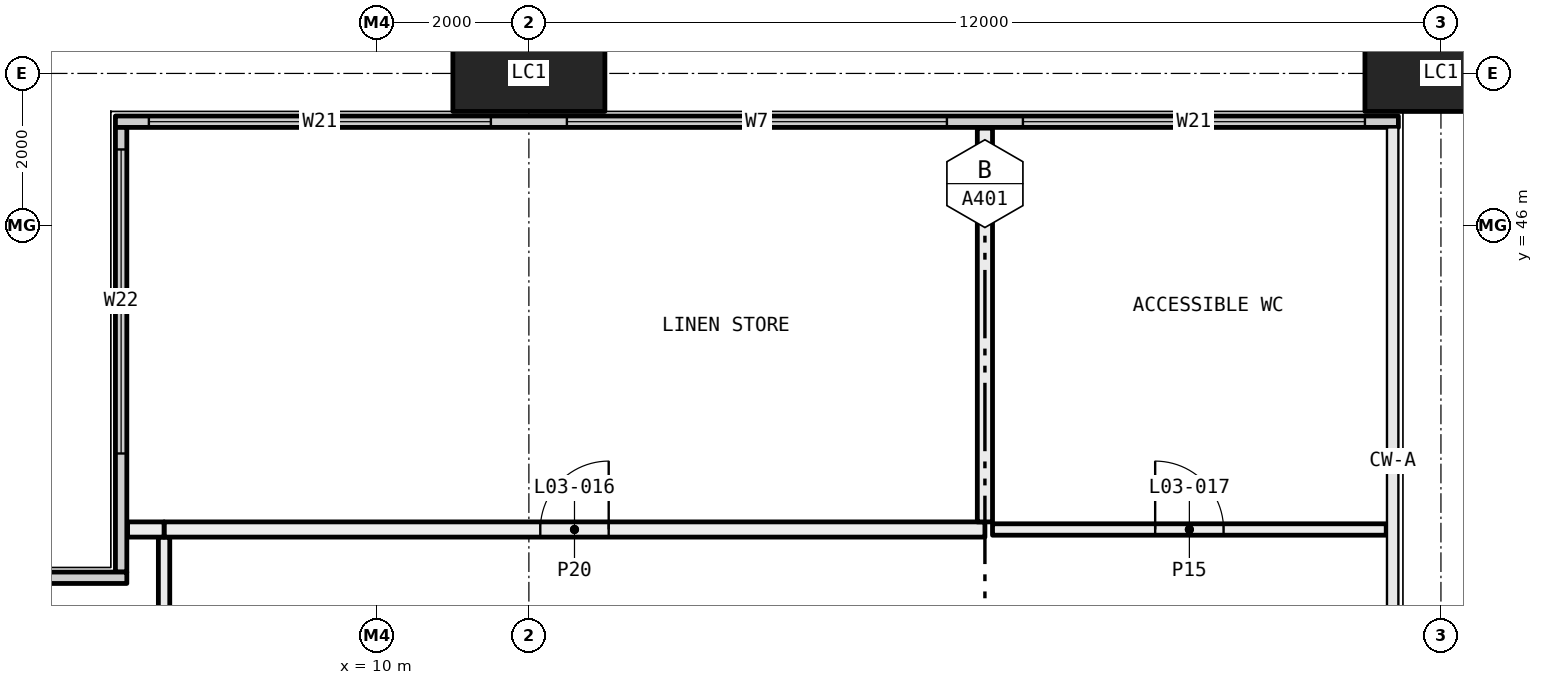
"""IFC4 building model, lengths in metres.
Left out: names, types, materials, properties, quantities, classifications, styles, units other than length and angle.
Written with IfcOpenShell. Run it as: python <this file> out.ifc"""

import sys

from ifc_helpers import new_model, si_unit, direction, frame, frame_2d, origin, origin_2d, place, context, subcontext, project, spatial, rectangle, hollow_rectangle, extrude, element, fill, save


model = new_model("IFC4")
c1 = context("Model", 3, precision=1e-05, world=origin(), true_north=direction((0.0, 1.0)))
c2 = subcontext(c1, "Body", "Model", "MODEL_VIEW")
j1 = project(units=[si_unit("LENGTHUNIT", "METRE"), si_unit("PLANEANGLEUNIT", "RADIAN")], contexts=[c1])
p1 = place(None, origin())
s1 = spatial("IfcSite", under=j1, at=p1, CompositionType="ELEMENT")
p2 = place(p1, origin())
s2 = spatial("IfcBuilding", under=s1, at=p2, CompositionType="ELEMENT")
p3 = place(p2, frame((0.0, 0.0, 18.0)))
s3 = spatial("IfcBuildingStorey", under=s2, at=p3, CompositionType="ELEMENT", Elevation=18.0)
for number, where, z_axis, x_axis in (
    (1, (12.0, 48.0, -0.4), (0.0, 0.0, 1.0), (1.0, 0.0, 0.0)),
    (2, (24.0, 48.0, -0.4), (0.0, 0.0, 1.0), (1.0, 0.0, 0.0)),
):
    element("IfcColumn", number, at=place(p3, frame(where, z_axis=z_axis, x_axis=x_axis)), inside=s3, PredefinedType="COLUMN", context=c2, shape_type="SweptSolid", body=[
        extrude(hollow_rectangle(XDim=2.0, YDim=1.0, WallThickness=0.08, at=origin_2d()), origin(), (0.0, 0.0, 1.0), 6.0),
    ])
p4 = place(p3, frame((6.56, 47.365, 0.0), z_axis=(0.0, 0.0, 1.0), x_axis=(1.0, 0.0, 0.0)))
e3 = element("IfcWall", 3, at=p4, inside=s3, PredefinedType="ELEMENTEDWALL", context=c2, shape_type="SweptSolid", body=[
    extrude(rectangle(XDim=16.88, YDim=0.15, at=frame_2d((8.44, 0.0))), origin(), (0.0, 0.0, 1.0), 5.6),
])
p5 = place(p4, frame((0.44, 0.0, 0.45)))
e4 = element("IfcOpeningElement", 4, at=p5, cuts=e3, PredefinedType="OPENING", context=c2, shape_type="SweptSolid", body=[
    extrude(rectangle(XDim=4.5, YDim=5.1, at=frame_2d((2.25, 2.55))), frame((0.0, 0.085, 0.0), z_axis=(0.0, -1.0, 0.0), x_axis=(1.0, 0.0, 0.0)), (0.0, 0.0, 1.0), 0.17),
])
p6 = place(p4, frame((5.94, 0.0, 0.45)))
e5 = element("IfcOpeningElement", 5, at=p6, cuts=e3, PredefinedType="OPENING", context=c2, shape_type="SweptSolid", body=[
    extrude(rectangle(XDim=5.0, YDim=5.1, at=frame_2d((2.5, 2.55))), frame((0.0, 0.085, 0.0), z_axis=(0.0, -1.0, 0.0), x_axis=(1.0, 0.0, 0.0)), (0.0, 0.0, 1.0), 0.17),
])
p7 = place(p4, frame((11.94, 0.0, 0.45)))
e6 = element("IfcOpeningElement", 6, at=p7, cuts=e3, PredefinedType="OPENING", context=c2, shape_type="SweptSolid", body=[
    extrude(rectangle(XDim=4.5, YDim=5.1, at=frame_2d((2.25, 2.55))), frame((0.0, 0.085, 0.0), z_axis=(0.0, -1.0, 0.0), x_axis=(1.0, 0.0, 0.0)), (0.0, 0.0, 1.0), 0.17),
])
p8 = place(p3, frame((6.635, 41.44, 0.0), z_axis=(0.0, 0.0, 1.0), x_axis=(0.0, 1.0, 0.0)))
e7 = element("IfcWall", 7, at=p8, inside=s3, PredefinedType="ELEMENTEDWALL", context=c2, shape_type="SweptSolid", body=[
    extrude(rectangle(XDim=5.85, YDim=0.15, at=frame_2d((2.925, 0.0))), origin(), (0.0, 0.0, 1.0), 5.6),
])
p9 = place(p8, frame((1.56, 0.0, 0.45)))
e8 = element("IfcOpeningElement", 8, at=p9, cuts=e7, PredefinedType="OPENING", context=c2, shape_type="SweptSolid", body=[
    extrude(rectangle(XDim=4.0, YDim=5.1, at=frame_2d((2.0, 2.55))), frame((0.0, 0.085, 0.0), z_axis=(0.0, -1.0, 0.0), x_axis=(1.0, 0.0, 0.0)), (0.0, 0.0, 1.0), 0.17),
])
p10 = place(p3, frame((0.56, 41.365, 0.0), z_axis=(0.0, 0.0, 1.0), x_axis=(1.0, 0.0, 0.0)))
e9 = element("IfcWall", 9, at=p10, inside=s3, PredefinedType="ELEMENTEDWALL", context=c2, shape_type="SweptSolid", body=[
    extrude(rectangle(XDim=6.15, YDim=0.15, at=frame_2d((3.075, 0.0))), origin(), (0.0, 0.0, 1.0), 5.6),
])
p11 = place(p10, frame((0.44, 0.0, 0.45)))
e10 = element("IfcOpeningElement", 10, at=p11, cuts=e9, PredefinedType="OPENING", context=c2, shape_type="SweptSolid", body=[
    extrude(rectangle(XDim=4.0, YDim=5.1, at=frame_2d((2.0, 2.55))), frame((0.0, 0.085, 0.0), z_axis=(0.0, -1.0, 0.0), x_axis=(1.0, 0.0, 0.0)), (0.0, 0.0, 1.0), 0.17),
])
p12 = place(p3, frame((7.2, 41.9, 0.0), z_axis=(0.0, 0.0, 1.0), x_axis=(0.0, -1.0, 0.0)))
e11 = element("IfcWall", 11, at=p12, inside=s3, PredefinedType="PARTITIONING", context=c2, shape_type="SweptSolid", body=[
    extrude(rectangle(XDim=5.825, YDim=0.15, at=frame_2d((2.913, 0.0))), origin(), (0.0, 0.0, 1.0), 5.6),
])
p13 = place(p12, frame((2.462, 0.0, 0.0)))
e12 = element("IfcOpeningElement", 12, at=p13, cuts=e11, PredefinedType="OPENING", context=c2, shape_type="SweptSolid", body=[
    extrude(rectangle(XDim=0.9, YDim=2.1, at=frame_2d((0.45, 1.05))), frame((0.0, 0.085, 0.0), z_axis=(0.0, -1.0, 0.0), x_axis=(1.0, 0.0, 0.0)), (0.0, 0.0, 1.0), 0.17),
])
p14 = place(p3, frame((18.0, 42.0, 0.0), z_axis=(0.0, 0.0, 1.0), x_axis=(-1.0, 0.0, 0.0)))
e13 = element("IfcWall", 13, at=p14, inside=s3, PredefinedType="PARTITIONING", context=c2, shape_type="SweptSolid", body=[
    extrude(rectangle(XDim=10.8, YDim=0.2, at=frame_2d((5.4, 0.0))), origin(), (0.0, 0.0, 1.0), 5.6),
])
p15 = place(p14, frame((4.95, 0.0, 0.0)))
e14 = element("IfcOpeningElement", 14, at=p15, cuts=e13, PredefinedType="OPENING", context=c2, shape_type="SweptSolid", body=[
    extrude(rectangle(XDim=0.9, YDim=2.1, at=frame_2d((0.45, 1.05))), frame((0.0, 0.11, 0.0), z_axis=(0.0, -1.0, 0.0), x_axis=(1.0, 0.0, 0.0)), (0.0, 0.0, 1.0), 0.22),
])
p16 = place(p3, frame((23.28, 42.0, 0.0), z_axis=(0.0, 0.0, 1.0), x_axis=(-1.0, 0.0, 0.0)))
e15 = element("IfcWall", 15, at=p16, inside=s3, PredefinedType="PARTITIONING", context=c2, shape_type="SweptSolid", body=[
    extrude(rectangle(XDim=5.18, YDim=0.15, at=frame_2d((2.59, 0.0))), origin(), (0.0, 0.0, 1.0), 5.6),
])
p17 = place(p16, frame((2.14, 0.0, 0.0)))
e16 = element("IfcOpeningElement", 16, at=p17, cuts=e15, PredefinedType="OPENING", context=c2, shape_type="SweptSolid", body=[
    extrude(rectangle(XDim=0.9, YDim=2.1, at=frame_2d((0.45, 1.05))), frame((0.0, 0.085, 0.0), z_axis=(0.0, -1.0, 0.0), x_axis=(1.0, 0.0, 0.0)), (0.0, 0.0, 1.0), 0.17),
])
p18 = place(p3, frame((7.2, 42.0, 0.0), z_axis=(0.0, 0.0, 1.0), x_axis=(-1.0, 0.0, 0.0)))
e17 = element("IfcWall", 17, at=p18, inside=s3, PredefinedType="PARTITIONING", context=c2, shape_type="SweptSolid", body=[
    extrude(rectangle(XDim=0.48, YDim=0.2, at=frame_2d((0.24, 0.0))), origin(), (0.0, 0.0, 1.0), 5.6),
])
p19 = place(p3, frame((18.0, 42.1, 0.0), z_axis=(0.0, 0.0, 1.0), x_axis=(0.0, 1.0, 0.0)))
e18 = element("IfcWall", 18, at=p19, inside=s3, PredefinedType="PARTITIONING", context=c2, shape_type="SweptSolid", body=[
    extrude(rectangle(XDim=5.18, YDim=0.2, at=frame_2d((2.59, 0.0))), origin(), (0.0, 0.0, 1.0), 5.6),
])
p20 = place(p5, origin())
e19 = element("IfcWindow", 19, at=p20, inside=s3, PartitioningType="SINGLE_PANEL", PredefinedType="WINDOW", context=c2, shape_type="SweptSolid", body=[
    extrude(rectangle(XDim=4.5, YDim=5.1, at=frame_2d((2.25, 2.55))), frame((0.0, 0.03, 0.0), z_axis=(0.0, -1.0, 0.0), x_axis=(1.0, 0.0, 0.0)), (0.0, 0.0, 1.0), 0.06),
])
fill(e4, e19)
p21 = place(p6, origin())
e20 = element("IfcWindow", 20, at=p21, inside=s3, PartitioningType="SINGLE_PANEL", PredefinedType="WINDOW", context=c2, shape_type="SweptSolid", body=[
    extrude(rectangle(XDim=5.0, YDim=5.1, at=frame_2d((2.5, 2.55))), frame((0.0, 0.03, 0.0), z_axis=(0.0, -1.0, 0.0), x_axis=(1.0, 0.0, 0.0)), (0.0, 0.0, 1.0), 0.06),
])
fill(e5, e20)
p22 = place(p7, origin())
e21 = element("IfcWindow", 21, at=p22, inside=s3, PartitioningType="SINGLE_PANEL", PredefinedType="WINDOW", context=c2, shape_type="SweptSolid", body=[
    extrude(rectangle(XDim=4.5, YDim=5.1, at=frame_2d((2.25, 2.55))), frame((0.0, 0.03, 0.0), z_axis=(0.0, -1.0, 0.0), x_axis=(1.0, 0.0, 0.0)), (0.0, 0.0, 1.0), 0.06),
])
fill(e6, e21)
p23 = place(p9, origin())
e22 = element("IfcWindow", 22, at=p23, inside=s3, PartitioningType="SINGLE_PANEL", PredefinedType="WINDOW", context=c2, shape_type="SweptSolid", body=[
    extrude(rectangle(XDim=4.0, YDim=5.1, at=frame_2d((2.0, 2.55))), frame((0.0, 0.03, 0.0), z_axis=(0.0, -1.0, 0.0), x_axis=(1.0, 0.0, 0.0)), (0.0, 0.0, 1.0), 0.06),
])
fill(e8, e22)
p24 = place(p15, frame((0.9, 0.0, 0.0), x_axis=(-1.0, 0.0, 0.0)))
e23 = element("IfcDoor", 23, at=p24, inside=s3, OperationType="SINGLE_SWING_LEFT", PredefinedType="DOOR", context=c2, shape_type="SweptSolid", body=[
    extrude(rectangle(XDim=0.9, YDim=2.1, at=frame_2d((0.45, 1.05))), frame((0.0, 0.025, 0.0), z_axis=(0.0, -1.0, 0.0), x_axis=(1.0, 0.0, 0.0)), (0.0, 0.0, 1.0), 0.05),
])
fill(e14, e23)
p25 = place(p17, frame((0.9, 0.0, 0.0), x_axis=(-1.0, 0.0, 0.0)))
e24 = element("IfcDoor", 24, at=p25, inside=s3, OperationType="SINGLE_SWING_RIGHT", PredefinedType="DOOR", context=c2, shape_type="SweptSolid", body=[
    extrude(rectangle(XDim=0.9, YDim=2.1, at=frame_2d((0.45, 1.05))), frame((0.0, 0.025, 0.0), z_axis=(0.0, -1.0, 0.0), x_axis=(1.0, 0.0, 0.0)), (0.0, 0.0, 1.0), 0.05),
])
fill(e16, e24)
save(model, sys.argv[1])
